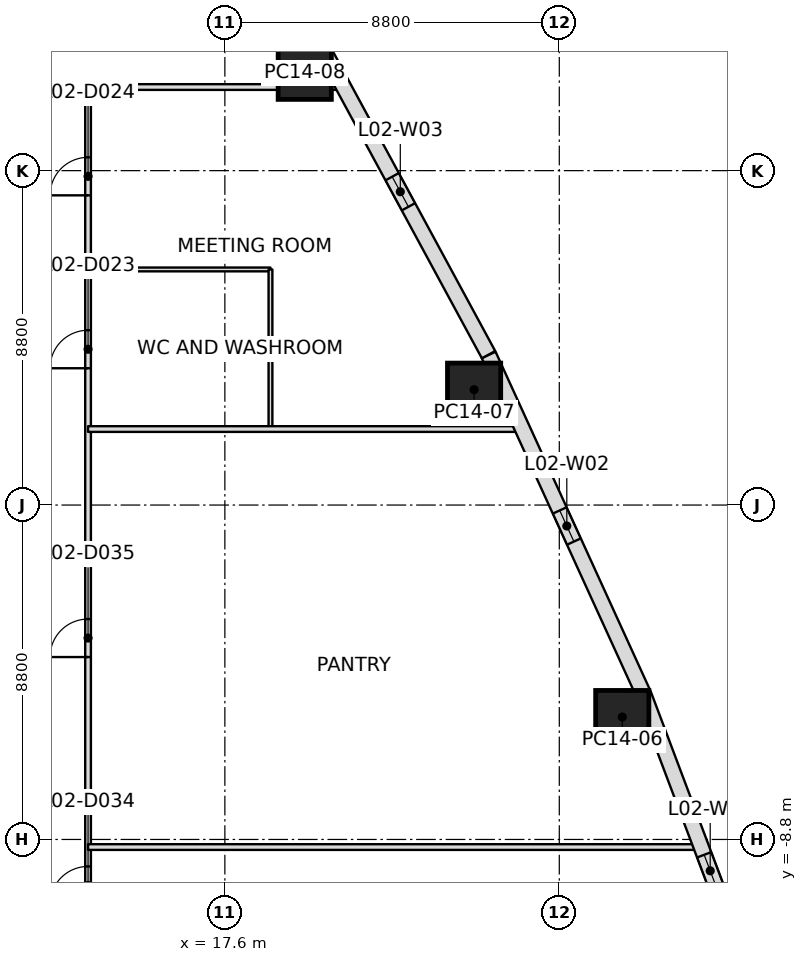
"""IFC4 building model, lengths in metres.
Left out: names, types, materials, properties, quantities, classifications, styles, units other than length and angle.
Written with IfcOpenShell. Run it as: python <this file> out.ifc"""

import sys

from ifc_helpers import new_model, si_unit, direction, frame, frame_2d, origin, origin_2d, place, context, subcontext, project, spatial, rectangle, extrude, element, fill, save


model = new_model("IFC4")
c1 = context("Model", 3, precision=1e-05, world=origin(), true_north=direction((0.0, 1.0)))
c2 = subcontext(c1, "Body", "Model", "MODEL_VIEW")
j1 = project(units=[si_unit("LENGTHUNIT", "METRE"), si_unit("PLANEANGLEUNIT", "RADIAN")], contexts=[c1])
p1 = place(None, origin())
s1 = spatial("IfcSite", under=j1, at=p1, CompositionType="ELEMENT")
p2 = place(p1, origin())
s2 = spatial("IfcBuilding", under=s1, at=p2, CompositionType="ELEMENT")
p3 = place(p2, frame((0.0, 0.0, 16.8)))
s3 = spatial("IfcBuildingStorey", under=s2, at=p3, CompositionType="ELEMENT", Elevation=16.8)
for number, where, z_axis, x_axis in (
    (1, (28.057, -5.579, 0.0), (0.0, 0.0, 1.0), (-0.382, 0.924, 0.0)),
    (2, (24.158, 3.035, 0.0), (0.0, 0.0, 1.0), (-0.442, 0.897, 0.0)),
    (3, (19.702, 11.375, 0.0), (0.0, 0.0, 1.0), (-0.5, 0.866, 0.0)),
):
    element("IfcColumn", number, at=place(p3, frame(where, z_axis=z_axis, x_axis=x_axis)), inside=s3, PredefinedType="COLUMN", context=c2, shape_type="SweptSolid", body=[
        extrude(rectangle(XDim=1.4, YDim=1.4, at=origin_2d()), origin(), (0.0, 0.0, 1.0), 5.4),
    ])
p4 = place(p3, frame((28.625, -4.993, 0.0), z_axis=(0.0, 0.0, 1.0), x_axis=(0.352569865932, -0.935785493389, 0.0)))
e4 = element("IfcWall", 4, at=p4, inside=s3, PredefinedType="STANDARD", context=c2, shape_type="SweptSolid", body=[
    extrude(rectangle(XDim=9.838, YDim=0.4, at=frame_2d((4.919, 0.0))), origin(), (0.0, 0.0, 1.0), 4.5),
])
p5 = place(p4, frame((4.5, 0.0, 1.2)))
e5 = element("IfcOpeningElement", 5, at=p5, cuts=e4, PredefinedType="OPENING", context=c2, shape_type="SweptSolid", body=[
    extrude(rectangle(XDim=0.9, YDim=2.4, at=frame_2d((0.45, 1.2))), frame((0.0, 0.2, 0.0), z_axis=(0.0, -1.0, 0.0), x_axis=(1.0, 0.0, 0.0)), (0.0, 0.0, 1.0), 0.4),
])
p6 = place(p3, frame((24.541, 3.951, 0.0), z_axis=(0.0, 0.0, 1.0), x_axis=(0.415399179946, -0.909639225902, 0.0)))
e6 = element("IfcWall", 6, at=p6, inside=s3, PredefinedType="STANDARD", context=c2, shape_type="SweptSolid", body=[
    extrude(rectangle(XDim=9.826, YDim=0.4, at=frame_2d((4.913, 0.0))), origin(), (0.0, 0.0, 1.0), 4.5),
])
p7 = place(p6, frame((4.5, 0.0, 1.2)))
e7 = element("IfcOpeningElement", 7, at=p7, cuts=e6, PredefinedType="OPENING", context=c2, shape_type="SweptSolid", body=[
    extrude(rectangle(XDim=0.9, YDim=2.4, at=frame_2d((0.45, 1.2))), frame((0.0, 0.2, 0.0), z_axis=(0.0, -1.0, 0.0), x_axis=(1.0, 0.0, 0.0)), (0.0, 0.0, 1.0), 0.4),
])
p8 = place(p3, frame((19.859, 12.597, 0.0), z_axis=(0.0, 0.0, 1.0), x_axis=(0.476254331716, -0.879307575039, 0.0)))
e8 = element("IfcWall", 8, at=p8, inside=s3, PredefinedType="STANDARD", context=c2, shape_type="SweptSolid", body=[
    extrude(rectangle(XDim=9.825, YDim=0.4, at=frame_2d((4.913, 0.0))), origin(), (0.0, 0.0, 1.0), 4.5),
])
p9 = place(p8, frame((4.5, 0.0, 1.2)))
e9 = element("IfcOpeningElement", 9, at=p9, cuts=e8, PredefinedType="OPENING", context=c2, shape_type="SweptSolid", body=[
    extrude(rectangle(XDim=0.9, YDim=2.4, at=frame_2d((0.45, 1.2))), frame((0.0, 0.2, 0.0), z_axis=(0.0, -1.0, 0.0), x_axis=(1.0, 0.0, 0.0)), (0.0, 0.0, 1.0), 0.4),
])
p10 = place(p3, frame((14.0, -9.0, 0.0), z_axis=(0.0, 0.0, 1.0), x_axis=(1.0, 0.0, 0.0)))
e10 = element("IfcWall", 10, at=p10, inside=s3, PredefinedType="PARTITIONING", context=c2, shape_type="SweptSolid", body=[
    extrude(rectangle(XDim=16.093, YDim=0.15, at=frame_2d((8.046, 0.0))), origin(), (0.0, 0.0, 1.0), 4.534),
])
p11 = place(p3, frame((25.361, 2.0, 0.0), z_axis=(0.0, 0.0, 1.0), x_axis=(-1.0, 0.0, 0.0)))
e11 = element("IfcWall", 11, at=p11, inside=s3, PredefinedType="PARTITIONING", context=c2, shape_type="SweptSolid", body=[
    extrude(rectangle(XDim=11.361, YDim=0.15, at=frame_2d((5.681, 0.0))), origin(), (0.0, 0.0, 1.0), 4.534),
])
p12 = place(p3, frame((14.0, 11.0, 0.0), z_axis=(0.0, 0.0, 1.0), x_axis=(1.0, 0.0, 0.0)))
e12 = element("IfcWall", 12, at=p12, inside=s3, PredefinedType="PARTITIONING", context=c2, shape_type="SweptSolid", body=[
    extrude(rectangle(XDim=6.642, YDim=0.15, at=frame_2d((3.321, 0.0))), origin(), (0.0, 0.0, 1.0), 4.75),
])
p13 = place(p3, frame((13.92, 11.0, 0.0), z_axis=(0.0, 0.0, 1.0), x_axis=(-1.0, 0.0, 0.0)))
e13 = element("IfcWall", 13, at=p13, inside=s3, PredefinedType="PARTITIONING", context=c2, shape_type="SweptSolid", body=[
    extrude(rectangle(XDim=27.84, YDim=0.15, at=frame_2d((13.92, 0.0))), origin(), (0.0, 0.0, 1.0), 4.247),
])
p14 = place(p13, frame((3.11, 0.0, 0.0)))
e14 = element("IfcOpeningElement", 14, at=p14, cuts=e13, PredefinedType="OPENING", context=c2, shape_type="SweptSolid", body=[
    extrude(rectangle(XDim=1.6, YDim=2.1, at=frame_2d((0.8, 1.05))), frame((0.0, 0.075, 0.0), z_axis=(0.0, -1.0, 0.0), x_axis=(1.0, 0.0, 0.0)), (0.0, 0.0, 1.0), 0.15),
])
p15 = place(p13, frame((12.92, 0.0, 0.0)))
e15 = element("IfcOpeningElement", 15, at=p15, cuts=e13, PredefinedType="OPENING", context=c2, shape_type="SweptSolid", body=[
    extrude(rectangle(XDim=1.0, YDim=2.1, at=frame_2d((0.5, 1.05))), frame((0.0, 0.075, 0.0), z_axis=(0.0, -1.0, 0.0), x_axis=(1.0, 0.0, 0.0)), (0.0, 0.0, 1.0), 0.15),
])
p16 = place(p13, frame((22.63, 0.0, 0.0)))
e16 = element("IfcOpeningElement", 16, at=p16, cuts=e13, PredefinedType="OPENING", context=c2, shape_type="SweptSolid", body=[
    extrude(rectangle(XDim=1.6, YDim=2.1, at=frame_2d((0.8, 1.05))), frame((0.0, 0.075, 0.0), z_axis=(0.0, -1.0, 0.0), x_axis=(1.0, 0.0, 0.0)), (0.0, 0.0, 1.0), 0.15),
])
p17 = place(p3, frame((14.0, -10.92, 0.0), z_axis=(0.0, 0.0, 1.0), x_axis=(0.0, 1.0, 0.0)))
e17 = element("IfcWall", 17, at=p17, inside=s3, PredefinedType="PARTITIONING", context=c2, shape_type="SweptSolid", body=[
    extrude(rectangle(XDim=21.84, YDim=0.15, at=frame_2d((10.92, 0.0))), origin(), (0.0, 0.0, 1.0), 4.247),
])
p18 = place(p17, frame((14.52, 0.0, 0.0)))
e18 = element("IfcOpeningElement", 18, at=p18, cuts=e17, PredefinedType="OPENING", context=c2, shape_type="SweptSolid", body=[
    extrude(rectangle(XDim=1.0, YDim=2.1, at=frame_2d((0.5, 1.05))), frame((0.0, 0.075, 0.0), z_axis=(0.0, -1.0, 0.0), x_axis=(1.0, 0.0, 0.0)), (0.0, 0.0, 1.0), 0.15),
])
p19 = place(p17, frame((19.07, 0.0, 0.0)))
e19 = element("IfcOpeningElement", 19, at=p19, cuts=e17, PredefinedType="OPENING", context=c2, shape_type="SweptSolid", body=[
    extrude(rectangle(XDim=1.0, YDim=2.1, at=frame_2d((0.5, 1.05))), frame((0.0, 0.075, 0.0), z_axis=(0.0, -1.0, 0.0), x_axis=(1.0, 0.0, 0.0)), (0.0, 0.0, 1.0), 0.15),
])
p20 = place(p17, frame((0.41, 0.0, 0.0)))
e20 = element("IfcOpeningElement", 20, at=p20, cuts=e17, PredefinedType="OPENING", context=c2, shape_type="SweptSolid", body=[
    extrude(rectangle(XDim=1.0, YDim=2.1, at=frame_2d((0.5, 1.05))), frame((0.0, 0.075, 0.0), z_axis=(0.0, -1.0, 0.0), x_axis=(1.0, 0.0, 0.0)), (0.0, 0.0, 1.0), 0.15),
])
p21 = place(p17, frame((6.92, 0.0, 0.0)))
e21 = element("IfcOpeningElement", 21, at=p21, cuts=e17, PredefinedType="OPENING", context=c2, shape_type="SweptSolid", body=[
    extrude(rectangle(XDim=1.0, YDim=2.1, at=frame_2d((0.5, 1.05))), frame((0.0, 0.075, 0.0), z_axis=(0.0, -1.0, 0.0), x_axis=(1.0, 0.0, 0.0)), (0.0, 0.0, 1.0), 0.15),
])
p22 = place(p3, frame((14.03, 6.2, 0.0), z_axis=(0.0, 0.0, 1.0), x_axis=(1.0, 0.0, 0.0)))
e22 = element("IfcWall", 22, at=p22, inside=s3, PredefinedType="PARTITIONING", context=c2, shape_type="SweptSolid", body=[
    extrude(rectangle(XDim=4.77, YDim=0.1, at=frame_2d((2.385, 0.0))), origin(), (0.0, 0.0, 1.0), 4.693),
])
p23 = place(p3, frame((18.8, 6.2, 0.0), z_axis=(0.0, 0.0, 1.0), x_axis=(0.0, -1.0, 0.0)))
e23 = element("IfcWall", 23, at=p23, inside=s3, PredefinedType="PARTITIONING", context=c2, shape_type="SweptSolid", body=[
    extrude(rectangle(XDim=4.17, YDim=0.1, at=frame_2d((2.085, 0.0))), origin(), (0.0, 0.0, 1.0), 4.617),
])
p24 = place(p5, origin())
e24 = element("IfcWindow", 24, at=p24, inside=s3, PartitioningType="SINGLE_PANEL", PredefinedType="WINDOW", context=c2, shape_type="SweptSolid", body=[
    extrude(rectangle(XDim=0.9, YDim=2.4, at=frame_2d((0.45, 1.2))), frame((0.0, 0.03, 0.0), z_axis=(0.0, -1.0, 0.0), x_axis=(1.0, 0.0, 0.0)), (0.0, 0.0, 1.0), 0.06),
])
fill(e5, e24)
p25 = place(p7, origin())
e25 = element("IfcWindow", 25, at=p25, inside=s3, PartitioningType="SINGLE_PANEL", PredefinedType="WINDOW", context=c2, shape_type="SweptSolid", body=[
    extrude(rectangle(XDim=0.9, YDim=2.4, at=frame_2d((0.45, 1.2))), frame((0.0, 0.03, 0.0), z_axis=(0.0, -1.0, 0.0), x_axis=(1.0, 0.0, 0.0)), (0.0, 0.0, 1.0), 0.06),
])
fill(e7, e25)
p26 = place(p9, origin())
e26 = element("IfcWindow", 26, at=p26, inside=s3, PartitioningType="SINGLE_PANEL", PredefinedType="WINDOW", context=c2, shape_type="SweptSolid", body=[
    extrude(rectangle(XDim=0.9, YDim=2.4, at=frame_2d((0.45, 1.2))), frame((0.0, 0.03, 0.0), z_axis=(0.0, -1.0, 0.0), x_axis=(1.0, 0.0, 0.0)), (0.0, 0.0, 1.0), 0.06),
])
fill(e9, e26)
p27 = place(p18, origin())
e27 = element("IfcDoor", 27, at=p27, inside=s3, OperationType="SINGLE_SWING_RIGHT", PredefinedType="DOOR", context=c2, shape_type="SweptSolid", body=[
    extrude(rectangle(XDim=1.0, YDim=2.1, at=frame_2d((0.5, 1.05))), frame((0.0, 0.025, 0.0), z_axis=(0.0, -1.0, 0.0), x_axis=(1.0, 0.0, 0.0)), (0.0, 0.0, 1.0), 0.05),
])
fill(e18, e27)
p28 = place(p19, origin())
e28 = element("IfcDoor", 28, at=p28, inside=s3, OperationType="SINGLE_SWING_LEFT", PredefinedType="DOOR", context=c2, shape_type="SweptSolid", body=[
    extrude(rectangle(XDim=1.0, YDim=2.1, at=frame_2d((0.5, 1.05))), frame((0.0, 0.025, 0.0), z_axis=(0.0, -1.0, 0.0), x_axis=(1.0, 0.0, 0.0)), (0.0, 0.0, 1.0), 0.05),
])
fill(e19, e28)
p29 = place(p20, origin())
e29 = element("IfcDoor", 29, at=p29, inside=s3, OperationType="SINGLE_SWING_LEFT", PredefinedType="DOOR", context=c2, shape_type="SweptSolid", body=[
    extrude(rectangle(XDim=1.0, YDim=2.1, at=frame_2d((0.5, 1.05))), frame((0.0, 0.025, 0.0), z_axis=(0.0, -1.0, 0.0), x_axis=(1.0, 0.0, 0.0)), (0.0, 0.0, 1.0), 0.05),
])
fill(e20, e29)
p30 = place(p21, origin())
e30 = element("IfcDoor", 30, at=p30, inside=s3, OperationType="SINGLE_SWING_LEFT", PredefinedType="DOOR", context=c2, shape_type="SweptSolid", body=[
    extrude(rectangle(XDim=1.0, YDim=2.1, at=frame_2d((0.5, 1.05))), frame((0.0, 0.025, 0.0), z_axis=(0.0, -1.0, 0.0), x_axis=(1.0, 0.0, 0.0)), (0.0, 0.0, 1.0), 0.05),
])
fill(e21, e30)
save(model, sys.argv[1])
